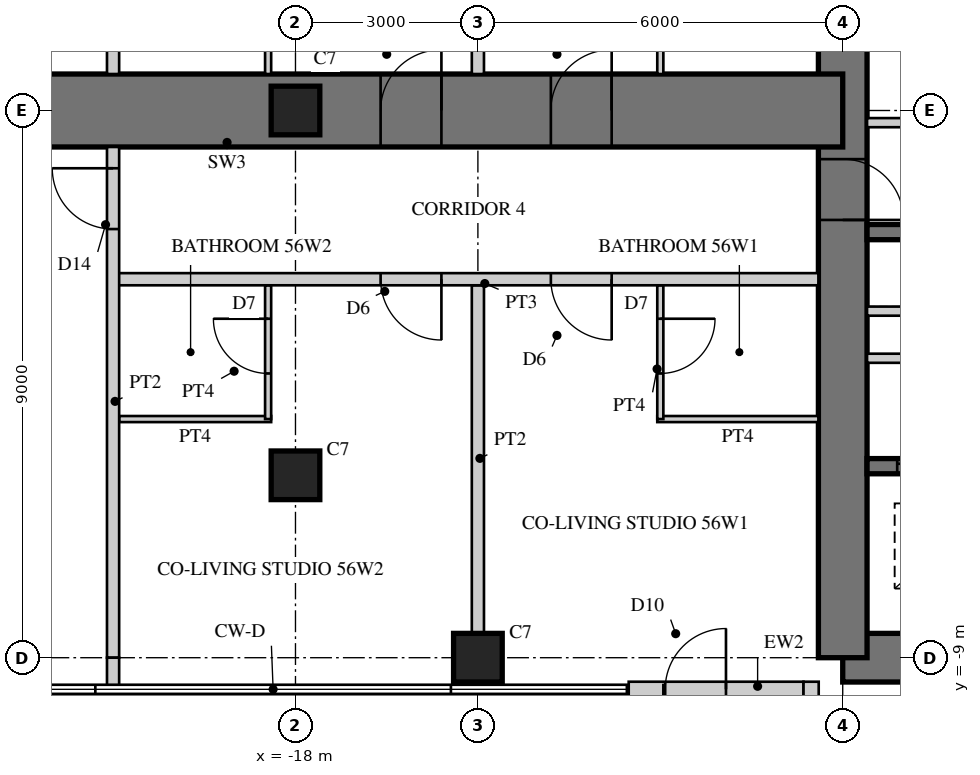
"""IFC4 building model, lengths in metres.
Left out: names, types, materials, properties, quantities, classifications, styles, units other than length and angle.
Written with IfcOpenShell. Run it as: python <this file> out.ifc"""

import sys

from ifc_helpers import new_model, si_unit, direction, frame, frame_2d, origin, origin_2d, place, context, subcontext, project, spatial, rectangle, hollow_rectangle, extrude, element, fill, save


model = new_model("IFC4")
c1 = context("Model", 3, precision=1e-05, world=origin(), true_north=direction((0.0, 1.0)))
c2 = subcontext(c1, "Body", "Model", "MODEL_VIEW")
j1 = project(units=[si_unit("LENGTHUNIT", "METRE"), si_unit("PLANEANGLEUNIT", "RADIAN")], contexts=[c1])
p1 = place(None, origin())
s1 = spatial("IfcSite", under=j1, at=p1, CompositionType="ELEMENT")
p2 = place(p1, origin())
s2 = spatial("IfcBuilding", under=s1, at=p2, CompositionType="ELEMENT")
p3 = place(p2, frame((0.0, 0.0, 222.1)))
s3 = spatial("IfcBuildingStorey", under=s2, at=p3, CompositionType="ELEMENT", Elevation=222.1)
p4 = place(p3, frame((-9.0, -9.0, 0.0), z_axis=(0.0, 0.0, 1.0), x_axis=(1.0, 0.0, 0.0)))
e1 = element("IfcWall", 1, at=p4, inside=s3, PredefinedType="SHEAR", context=c2, shape_type="SweptSolid", body=[
    extrude(rectangle(XDim=18.0, YDim=0.8, at=frame_2d((9.0, 0.0))), origin(), (0.0, 0.0, 1.0), 3.4),
])
p5 = place(p4, frame((9.8, 0.0, 0.0)))
e2 = element("IfcOpeningElement", 2, at=p5, cuts=e1, PredefinedType="OPENING", context=c2, shape_type="SweptSolid", body=[
    extrude(rectangle(XDim=1.0, YDim=2.4, at=frame_2d((0.5, 1.2))), frame((0.0, 0.41, 0.0), z_axis=(0.0, -1.0, 0.0), x_axis=(1.0, 0.0, 0.0)), (0.0, 0.0, 1.0), 0.82),
])
p6 = place(p3, frame((-9.0, 9.0, 0.0), z_axis=(0.0, 0.0, 1.0), x_axis=(0.0, -1.0, 0.0)))
e3 = element("IfcWall", 3, at=p6, inside=s3, PredefinedType="SHEAR", context=c2, shape_type="SweptSolid", body=[
    extrude(rectangle(XDim=18.0, YDim=0.8, at=frame_2d((9.0, 0.0))), origin(), (0.0, 0.0, 1.0), 3.4),
])
p7 = place(p6, frame((9.8, 0.0, 0.0)))
e4 = element("IfcOpeningElement", 4, at=p7, cuts=e3, PredefinedType="OPENING", context=c2, shape_type="SweptSolid", body=[
    extrude(rectangle(XDim=1.0, YDim=2.4, at=frame_2d((0.5, 1.2))), frame((0.0, 0.41, 0.0), z_axis=(0.0, -1.0, 0.0), x_axis=(1.0, 0.0, 0.0)), (0.0, 0.0, 1.0), 0.82),
])
p8 = place(p3, frame((-1.925, -2.0, 0.0), z_axis=(0.0, 0.0, 1.0), x_axis=(-1.0, 0.0, 0.0)))
e5 = element("IfcWall", 5, at=p8, inside=s3, PredefinedType="SHEAR", context=c2, shape_type="SweptSolid", body=[
    extrude(rectangle(XDim=6.675, YDim=0.25, at=frame_2d((3.337, 0.0))), origin(), (0.0, 0.0, 1.0), 3.4),
])
p9 = place(p3, frame((-1.925, -5.85, 0.0), z_axis=(0.0, 0.0, 1.0), x_axis=(-1.0, 0.0, 0.0)))
e6 = element("IfcWall", 6, at=p9, inside=s3, PredefinedType="SHEAR", context=c2, shape_type="SweptSolid", body=[
    extrude(rectangle(XDim=6.675, YDim=0.25, at=frame_2d((3.337, 0.0))), origin(), (0.0, 0.0, 1.0), 3.4),
])
p10 = place(p9, frame((0.496, 0.0, 0.0)))
e7 = element("IfcOpeningElement", 7, at=p10, cuts=e6, PredefinedType="OPENING", context=c2, shape_type="SweptSolid", body=[
    extrude(rectangle(XDim=1.1, YDim=2.2, at=frame_2d((0.55, 1.1))), frame((0.0, 0.135, 0.0), z_axis=(0.0, -1.0, 0.0), x_axis=(1.0, 0.0, 0.0)), (0.0, 0.0, 1.0), 0.27),
])
p11 = place(p9, frame((2.788, 0.0, 0.0)))
e8 = element("IfcOpeningElement", 8, at=p11, cuts=e6, PredefinedType="OPENING", context=c2, shape_type="SweptSolid", body=[
    extrude(rectangle(XDim=1.1, YDim=2.2, at=frame_2d((0.55, 1.1))), frame((0.0, 0.135, 0.0), z_axis=(0.0, -1.0, 0.0), x_axis=(1.0, 0.0, 0.0)), (0.0, 0.0, 1.0), 0.27),
])
p12 = place(p9, frame((5.079, 0.0, 0.0)))
e9 = element("IfcOpeningElement", 9, at=p12, cuts=e6, PredefinedType="OPENING", context=c2, shape_type="SweptSolid", body=[
    extrude(rectangle(XDim=1.1, YDim=2.2, at=frame_2d((0.55, 1.1))), frame((0.0, 0.135, 0.0), z_axis=(0.0, -1.0, 0.0), x_axis=(1.0, 0.0, 0.0)), (0.0, 0.0, 1.0), 0.27),
])
p13 = place(p3, frame((-1.925, -3.3, 0.0), z_axis=(0.0, 0.0, 1.0), x_axis=(-1.0, 0.0, 0.0)))
e10 = element("IfcWall", 10, at=p13, inside=s3, PredefinedType="PARTITIONING", context=c2, shape_type="SweptSolid", body=[
    extrude(rectangle(XDim=6.675, YDim=0.15, at=frame_2d((3.337, 0.0))), origin(), (0.0, 0.0, 1.0), 3.4),
])
p14 = place(p13, frame((0.075, 0.0, 0.0)))
e11 = element("IfcOpeningElement", 11, at=p14, cuts=e10, PredefinedType="OPENING", context=c2, shape_type="SweptSolid", body=[
    extrude(rectangle(XDim=0.8, YDim=2.1, at=frame_2d((0.4, 1.05))), frame((0.0, 0.085, 0.0), z_axis=(0.0, -1.0, 0.0), x_axis=(1.0, 0.0, 0.0)), (0.0, 0.0, 1.0), 0.17),
])
p15 = place(p13, frame((3.675, 0.0, 0.0)))
e12 = element("IfcOpeningElement", 12, at=p15, cuts=e10, PredefinedType="OPENING", context=c2, shape_type="SweptSolid", body=[
    extrude(rectangle(XDim=0.8, YDim=2.1, at=frame_2d((0.4, 1.05))), frame((0.0, 0.085, 0.0), z_axis=(0.0, -1.0, 0.0), x_axis=(1.0, 0.0, 0.0)), (0.0, 0.0, 1.0), 0.17),
])
p16 = place(p3, frame((-9.0, 0.0, 0.0), z_axis=(0.0, 0.0, 1.0), x_axis=(-1.0, 0.0, 0.0)))
e13 = element("IfcWall", 13, at=p16, inside=s3, PredefinedType="SHEAR", context=c2, shape_type="SweptSolid", body=[
    extrude(rectangle(XDim=18.0, YDim=1.2, at=frame_2d((9.0, 0.0))), origin(), (0.0, 0.0, 1.0), 3.4),
])
p17 = place(p16, frame((3.8, 0.0, 0.0)))
e14 = element("IfcOpeningElement", 14, at=p17, cuts=e13, PredefinedType="OPENING", context=c2, shape_type="SweptSolid", body=[
    extrude(rectangle(XDim=1.0, YDim=2.15, at=frame_2d((0.5, 1.075))), frame((0.0, 0.61, 0.0), z_axis=(0.0, -1.0, 0.0), x_axis=(1.0, 0.0, 0.0)), (0.0, 0.0, 1.0), 1.22),
])
p18 = place(p16, frame((6.6, 0.0, 0.0)))
e15 = element("IfcOpeningElement", 15, at=p18, cuts=e13, PredefinedType="OPENING", context=c2, shape_type="SweptSolid", body=[
    extrude(rectangle(XDim=1.0, YDim=2.15, at=frame_2d((0.5, 1.075))), frame((0.0, 0.61, 0.0), z_axis=(0.0, -1.0, 0.0), x_axis=(1.0, 0.0, 0.0)), (0.0, 0.0, 1.0), 1.22),
])
p19 = place(p16, frame((13.3, 0.0, 0.0)))
e16 = element("IfcOpeningElement", 16, at=p19, cuts=e13, PredefinedType="OPENING", context=c2, shape_type="SweptSolid", body=[
    extrude(rectangle(XDim=1.0, YDim=2.2, at=frame_2d((0.5, 1.1))), frame((0.0, 0.61, 0.0), z_axis=(0.0, -1.0, 0.0), x_axis=(1.0, 0.0, 0.0)), (0.0, 0.0, 1.0), 1.22),
])
for number, where, z_axis, x_axis in (
    (17, (-15.0, -9.0, 0.0), (0.0, 0.0, 1.0), (1.0, 0.0, 0.0)),
    (18, (-18.0, 0.0, 0.0), (0.0, 0.0, 1.0), (1.0, 0.0, 0.0)),
    (19, (-18.0, -6.0, 0.0), (0.0, 0.0, 1.0), (1.0, 0.0, 0.0)),
):
    element("IfcColumn", number, at=place(p3, frame(where, z_axis=z_axis, x_axis=x_axis)), inside=s3, PredefinedType="COLUMN", context=c2, shape_type="SweptSolid", body=[
        extrude(rectangle(XDim=0.8, YDim=0.8, at=origin_2d()), origin(), (0.0, 0.0, 1.0), 3.4),
    ])
p20 = place(p3, frame((-12.52, -9.52, 0.0), z_axis=(0.0, 0.0, 1.0), x_axis=(1.0, 0.0, 0.0)))
e20 = element("IfcWall", 20, at=p20, inside=s3, PredefinedType="SOLIDWALL", context=c2, shape_type="SweptSolid", body=[
    extrude(rectangle(XDim=2.875, YDim=0.25, at=frame_2d((1.438, 0.0))), origin(), (0.0, 0.0, 1.0), 3.22),
])
p21 = place(p20, frame((0.6, 0.0, 0.0)))
e21 = element("IfcOpeningElement", 21, at=p21, cuts=e20, PredefinedType="OPENING", context=c2, shape_type="SweptSolid", body=[
    extrude(rectangle(XDim=1.0, YDim=2.2, at=frame_2d((0.5, 1.1))), frame((0.0, 0.135, 0.0), z_axis=(0.0, -1.0, 0.0), x_axis=(1.0, 0.0, 0.0)), (0.0, 0.0, 1.0), 0.27),
])
p22 = place(p3, frame((-9.52, -9.395, 0.0), z_axis=(0.0, 0.0, 1.0), x_axis=(0.0, -1.0, 0.0)))
e22 = element("IfcWall", 22, at=p22, inside=s3, PredefinedType="SOLIDWALL", context=c2, shape_type="SweptSolid", body=[
    extrude(rectangle(XDim=3.125, YDim=0.25, at=frame_2d((1.562, 0.0))), origin(), (0.0, 0.0, 1.0), 3.22),
])
p23 = place(p22, frame((0.6, 0.0, 0.0)))
e23 = element("IfcOpeningElement", 23, at=p23, cuts=e22, PredefinedType="OPENING", context=c2, shape_type="SweptSolid", body=[
    extrude(rectangle(XDim=1.0, YDim=2.2, at=frame_2d((0.5, 1.1))), frame((0.0, 0.135, 0.0), z_axis=(0.0, -1.0, 0.0), x_axis=(1.0, 0.0, 0.0)), (0.0, 0.0, 1.0), 0.27),
])
p24 = place(p3, frame((-2.325, -0.2, 0.0), z_axis=(0.0, 0.0, 1.0), x_axis=(-1.0, 0.0, 0.0)))
e24 = element("IfcWall", 24, at=p24, inside=s3, PredefinedType="PARTITIONING", context=c2, shape_type="SweptSolid", body=[
    extrude(rectangle(XDim=6.275, YDim=0.15, at=frame_2d((3.138, 0.0))), origin(), (0.0, 0.0, 1.0), 3.22),
])
p25 = place(p24, frame((0.4, 0.0, 0.0)))
e25 = element("IfcOpeningElement", 25, at=p25, cuts=e24, PredefinedType="OPENING", context=c2, shape_type="SweptSolid", body=[
    extrude(rectangle(XDim=1.0, YDim=2.1, at=frame_2d((0.5, 1.05))), frame((0.0, 0.085, 0.0), z_axis=(0.0, -1.0, 0.0), x_axis=(1.0, 0.0, 0.0)), (0.0, 0.0, 1.0), 0.17),
])
p26 = place(p3, frame((-3.325, -4.075, 0.0), z_axis=(0.0, 0.0, 1.0), x_axis=(-1.0, 0.0, 0.0)))
e26 = element("IfcWall", 26, at=p26, inside=s3, PredefinedType="PARTITIONING", context=c2, shape_type="SweptSolid", body=[
    extrude(rectangle(XDim=5.275, YDim=0.15, at=frame_2d((2.638, 0.0))), origin(), (0.0, 0.0, 1.0), 3.22),
])
p27 = place(p26, frame((2.137, 0.0, 0.0)))
e27 = element("IfcOpeningElement", 27, at=p27, cuts=e26, PredefinedType="OPENING", context=c2, shape_type="SweptSolid", body=[
    extrude(rectangle(XDim=1.0, YDim=2.1, at=frame_2d((0.5, 1.05))), frame((0.0, 0.085, 0.0), z_axis=(0.0, -1.0, 0.0), x_axis=(1.0, 0.0, 0.0)), (0.0, 0.0, 1.0), 0.17),
])
p28 = place(p3, frame((-9.4, -5.075, 0.0), z_axis=(0.0, 0.0, 1.0), x_axis=(-1.0, 0.0, 0.0)))
e28 = element("IfcWall", 28, at=p28, inside=s3, PredefinedType="PARTITIONING", context=c2, shape_type="SweptSolid", body=[
    extrude(rectangle(XDim=2.65, YDim=0.1, at=frame_2d((1.325, 0.0))), origin(), (0.0, 0.0, 1.0), 3.22),
])
p29 = place(p3, frame((-12.0, -2.875, 0.0), z_axis=(0.0, 0.0, 1.0), x_axis=(0.0, -1.0, 0.0)))
e29 = element("IfcWall", 29, at=p29, inside=s3, PredefinedType="PARTITIONING", context=c2, shape_type="SweptSolid", body=[
    extrude(rectangle(XDim=2.2, YDim=0.1, at=frame_2d((1.1, 0.0))), origin(), (0.0, 0.0, 1.0), 3.22),
])
p30 = place(p29, frame((0.55, 0.0, 0.0)))
e30 = element("IfcOpeningElement", 30, at=p30, cuts=e29, PredefinedType="OPENING", context=c2, shape_type="SweptSolid", body=[
    extrude(rectangle(XDim=0.9, YDim=2.1, at=frame_2d((0.45, 1.05))), frame((0.0, 0.06, 0.0), z_axis=(0.0, -1.0, 0.0), x_axis=(1.0, 0.0, 0.0)), (0.0, 0.0, 1.0), 0.12),
])
p31 = place(p3, frame((-12.0, 2.8, 0.0), z_axis=(0.0, 0.0, 1.0), x_axis=(0.0, -1.0, 0.0)))
e31 = element("IfcWall", 31, at=p31, inside=s3, PredefinedType="PARTITIONING", context=c2, shape_type="SweptSolid", body=[
    extrude(rectangle(XDim=2.2, YDim=0.1, at=frame_2d((1.1, 0.0))), origin(), (0.0, 0.0, 1.0), 3.22),
])
p32 = place(p31, frame((0.55, 0.0, 0.0)))
e32 = element("IfcOpeningElement", 32, at=p32, cuts=e31, PredefinedType="OPENING", context=c2, shape_type="SweptSolid", body=[
    extrude(rectangle(XDim=0.9, YDim=2.1, at=frame_2d((0.45, 1.05))), frame((0.0, 0.06, 0.0), z_axis=(0.0, -1.0, 0.0), x_axis=(1.0, 0.0, 0.0)), (0.0, 0.0, 1.0), 0.12),
])
p33 = place(p3, frame((-15.0, -2.875, 0.0), z_axis=(0.0, 0.0, 1.0), x_axis=(0.0, -1.0, 0.0)))
e33 = element("IfcWall", 33, at=p33, inside=s3, PredefinedType="SOLIDWALL", context=c2, shape_type="SweptSolid", body=[
    extrude(rectangle(XDim=5.725, YDim=0.2, at=frame_2d((2.863, 0.0))), origin(), (0.0, 0.0, 1.0), 2.52),
])
p34 = place(p3, frame((-15.0, 8.6, 0.0), z_axis=(0.0, 0.0, 1.0), x_axis=(0.0, -1.0, 0.0)))
e34 = element("IfcWall", 34, at=p34, inside=s3, PredefinedType="SOLIDWALL", context=c2, shape_type="SweptSolid", body=[
    extrude(rectangle(XDim=8.0, YDim=0.2, at=frame_2d((4.0, 0.0))), origin(), (0.0, 0.0, 1.0), 2.52),
])
p35 = place(p3, frame((-18.4, -5.075, 0.0), z_axis=(0.0, 0.0, 1.0), x_axis=(-1.0, 0.0, 0.0)))
e35 = element("IfcWall", 35, at=p35, inside=s3, PredefinedType="PARTITIONING", context=c2, shape_type="SweptSolid", body=[
    extrude(rectangle(XDim=2.5, YDim=0.1, at=frame_2d((1.25, 0.0))), origin(), (0.0, 0.0, 1.0), 3.22),
])
p36 = place(p3, frame((-18.45, -2.875, 0.0), z_axis=(0.0, 0.0, 1.0), x_axis=(0.0, -1.0, 0.0)))
e36 = element("IfcWall", 36, at=p36, inside=s3, PredefinedType="PARTITIONING", context=c2, shape_type="SweptSolid", body=[
    extrude(rectangle(XDim=2.2, YDim=0.1, at=frame_2d((1.1, 0.0))), origin(), (0.0, 0.0, 1.0), 3.22),
])
p37 = place(p36, frame((0.55, 0.0, 0.0)))
e37 = element("IfcOpeningElement", 37, at=p37, cuts=e36, PredefinedType="OPENING", context=c2, shape_type="SweptSolid", body=[
    extrude(rectangle(XDim=0.9, YDim=2.1, at=frame_2d((0.45, 1.05))), frame((0.0, 0.06, 0.0), z_axis=(0.0, -1.0, 0.0), x_axis=(1.0, 0.0, 0.0)), (0.0, 0.0, 1.0), 0.12),
])
p38 = place(p3, frame((-18.45, 2.8, 0.0), z_axis=(0.0, 0.0, 1.0), x_axis=(0.0, -1.0, 0.0)))
e38 = element("IfcWall", 38, at=p38, inside=s3, PredefinedType="PARTITIONING", context=c2, shape_type="SweptSolid", body=[
    extrude(rectangle(XDim=2.2, YDim=0.1, at=frame_2d((1.1, 0.0))), origin(), (0.0, 0.0, 1.0), 3.22),
])
p39 = place(p38, frame((0.55, 0.0, 0.0)))
e39 = element("IfcOpeningElement", 39, at=p39, cuts=e38, PredefinedType="OPENING", context=c2, shape_type="SweptSolid", body=[
    extrude(rectangle(XDim=0.9, YDim=2.1, at=frame_2d((0.45, 1.05))), frame((0.0, 0.06, 0.0), z_axis=(0.0, -1.0, 0.0), x_axis=(1.0, 0.0, 0.0)), (0.0, 0.0, 1.0), 0.12),
])
p40 = place(p3, frame((-9.4, -2.775, 0.0), z_axis=(0.0, 0.0, 1.0), x_axis=(-1.0, 0.0, 0.0)))
e40 = element("IfcWall", 40, at=p40, inside=s3, PredefinedType="SOLIDWALL", context=c2, shape_type="SweptSolid", body=[
    extrude(rectangle(XDim=11.6, YDim=0.2, at=frame_2d((5.8, 0.0))), origin(), (0.0, 0.0, 1.0), 3.22),
])
p41 = place(p40, frame((3.4, 0.0, 0.0)))
e41 = element("IfcOpeningElement", 41, at=p41, cuts=e40, PredefinedType="OPENING", context=c2, shape_type="SweptSolid", body=[
    extrude(rectangle(XDim=1.0, YDim=2.15, at=frame_2d((0.5, 1.075))), frame((0.0, 0.11, 0.0), z_axis=(0.0, -1.0, 0.0), x_axis=(1.0, 0.0, 0.0)), (0.0, 0.0, 1.0), 0.22),
])
p42 = place(p40, frame((6.2, 0.0, 0.0)))
e42 = element("IfcOpeningElement", 42, at=p42, cuts=e40, PredefinedType="OPENING", context=c2, shape_type="SweptSolid", body=[
    extrude(rectangle(XDim=1.0, YDim=2.15, at=frame_2d((0.5, 1.075))), frame((0.0, 0.11, 0.0), z_axis=(0.0, -1.0, 0.0), x_axis=(1.0, 0.0, 0.0)), (0.0, 0.0, 1.0), 0.22),
])
p43 = place(p3, frame((-21.0, 9.0, 0.0), z_axis=(0.0, 0.0, 1.0), x_axis=(0.0, -1.0, 0.0)))
e43 = element("IfcWall", 43, at=p43, inside=s3, PredefinedType="SOLIDWALL", context=c2, shape_type="SweptSolid", body=[
    extrude(rectangle(XDim=8.4, YDim=0.2, at=frame_2d((4.2, 0.0))), origin(), (0.0, 0.0, 1.0), 2.67),
])
p44 = place(p3, frame((-21.0, -0.6, 0.0), z_axis=(0.0, 0.0, 1.0), x_axis=(0.0, -1.0, 0.0)))
e44 = element("IfcWall", 44, at=p44, inside=s3, PredefinedType="SOLIDWALL", context=c2, shape_type="SweptSolid", body=[
    extrude(rectangle(XDim=8.4, YDim=0.2, at=frame_2d((4.2, 0.0))), origin(), (0.0, 0.0, 1.0), 2.67),
])
p45 = place(p44, frame((0.35, 0.0, 0.0)))
e45 = element("IfcOpeningElement", 45, at=p45, cuts=e44, PredefinedType="OPENING", context=c2, shape_type="SweptSolid", body=[
    extrude(rectangle(XDim=1.0, YDim=2.2, at=frame_2d((0.5, 1.1))), frame((0.0, 0.11, 0.0), z_axis=(0.0, -1.0, 0.0), x_axis=(1.0, 0.0, 0.0)), (0.0, 0.0, 1.0), 0.22),
])
p46 = place(p3, frame((-21.0, -9.0, 0.0), z_axis=(0.0, 0.0, 1.0), x_axis=(0.0, -1.0, 0.0)))
e46 = element("IfcWall", 46, at=p46, inside=s3, PredefinedType="SOLIDWALL", context=c2, shape_type="SweptSolid", body=[
    extrude(rectangle(XDim=0.48, YDim=0.2, at=frame_2d((0.24, 0.0))), origin(), (0.0, 0.0, 1.0), 3.22),
])
p47 = place(p21, origin())
e47 = element("IfcDoor", 47, at=p47, inside=s3, OperationType="SINGLE_SWING_RIGHT", PredefinedType="DOOR", context=c2, shape_type="SweptSolid", body=[
    extrude(hollow_rectangle(XDim=1.0, YDim=2.2, WallThickness=0.06, at=frame_2d((0.5, 1.1))), frame((0.0, 0.025, 0.0), z_axis=(0.0, -1.0, 0.0), x_axis=(1.0, 0.0, 0.0)), (0.0, 0.0, 1.0), 0.05),
    extrude(rectangle(XDim=0.879, YDim=2.079, at=frame_2d((0.5, 1.1))), frame((0.0, 0.025, 0.0), z_axis=(0.0, -1.0, 0.0), x_axis=(1.0, 0.0, 0.0)), (0.0, 0.0, 1.0), 0.05),
])
fill(e21, e47)
p48 = place(p30, origin())
e48 = element("IfcDoor", 48, at=p48, inside=s3, OperationType="SINGLE_SWING_LEFT", PredefinedType="DOOR", context=c2, shape_type="SweptSolid", body=[
    extrude(rectangle(XDim=0.9, YDim=2.1, at=frame_2d((0.45, 1.05))), frame((0.0, 0.025, 0.0), z_axis=(0.0, -1.0, 0.0), x_axis=(1.0, 0.0, 0.0)), (0.0, 0.0, 1.0), 0.05),
])
fill(e30, e48)
p49 = place(p37, frame((0.9, 0.0, 0.0), z_axis=(0.0, 0.0, 1.0), x_axis=(-1.0, 0.0, 0.0)))
e49 = element("IfcDoor", 49, at=p49, inside=s3, OperationType="SINGLE_SWING_RIGHT", PredefinedType="DOOR", context=c2, shape_type="SweptSolid", body=[
    extrude(rectangle(XDim=0.9, YDim=2.1, at=frame_2d((0.45, 1.05))), frame((0.0, 0.025, 0.0), z_axis=(0.0, -1.0, 0.0), x_axis=(1.0, 0.0, 0.0)), (0.0, 0.0, 1.0), 0.05),
])
fill(e37, e49)
p50 = place(p41, origin())
e50 = element("IfcDoor", 50, at=p50, inside=s3, OperationType="SINGLE_SWING_LEFT", PredefinedType="DOOR", context=c2, shape_type="SweptSolid", body=[
    extrude(rectangle(XDim=1.0, YDim=2.15, at=frame_2d((0.5, 1.075))), frame((0.0, 0.025, 0.0), z_axis=(0.0, -1.0, 0.0), x_axis=(1.0, 0.0, 0.0)), (0.0, 0.0, 1.0), 0.05),
])
fill(e41, e50)
p51 = place(p42, origin())
e51 = element("IfcDoor", 51, at=p51, inside=s3, OperationType="SINGLE_SWING_LEFT", PredefinedType="DOOR", context=c2, shape_type="SweptSolid", body=[
    extrude(rectangle(XDim=1.0, YDim=2.15, at=frame_2d((0.5, 1.075))), frame((0.0, 0.025, 0.0), z_axis=(0.0, -1.0, 0.0), x_axis=(1.0, 0.0, 0.0)), (0.0, 0.0, 1.0), 0.05),
])
fill(e42, e51)
p52 = place(p45, frame((1.0, 0.0, 0.0), z_axis=(0.0, 0.0, 1.0), x_axis=(-1.0, 0.0, 0.0)))
e52 = element("IfcDoor", 52, at=p52, inside=s3, OperationType="SINGLE_SWING_RIGHT", PredefinedType="DOOR", context=c2, shape_type="SweptSolid", body=[
    extrude(rectangle(XDim=1.0, YDim=2.2, at=frame_2d((0.5, 1.1))), frame((0.0, 0.025, 0.0), z_axis=(0.0, -1.0, 0.0), x_axis=(1.0, 0.0, 0.0)), (0.0, 0.0, 1.0), 0.05),
])
fill(e45, e52)
p53 = place(p17, frame((1.0, 0.0, 0.0), z_axis=(0.0, 0.0, 1.0), x_axis=(-1.0, 0.0, 0.0)))
e53 = element("IfcDoor", 53, at=p53, inside=s3, OperationType="SINGLE_SWING_RIGHT", PredefinedType="DOOR", context=c2, shape_type="SweptSolid", body=[
    extrude(rectangle(XDim=1.0, YDim=2.15, at=frame_2d((0.5, 1.075))), frame((0.0, 0.025, 0.0), z_axis=(0.0, -1.0, 0.0), x_axis=(1.0, 0.0, 0.0)), (0.0, 0.0, 1.0), 0.05),
])
fill(e14, e53)
p54 = place(p18, frame((1.0, 0.0, 0.0), z_axis=(0.0, 0.0, 1.0), x_axis=(-1.0, 0.0, 0.0)))
e54 = element("IfcDoor", 54, at=p54, inside=s3, OperationType="SINGLE_SWING_RIGHT", PredefinedType="DOOR", context=c2, shape_type="SweptSolid", body=[
    extrude(rectangle(XDim=1.0, YDim=2.15, at=frame_2d((0.5, 1.075))), frame((0.0, 0.025, 0.0), z_axis=(0.0, -1.0, 0.0), x_axis=(1.0, 0.0, 0.0)), (0.0, 0.0, 1.0), 0.05),
])
fill(e15, e54)
p55 = place(p7, origin())
e55 = element("IfcDoor", 55, at=p55, inside=s3, OperationType="SINGLE_SWING_RIGHT", PredefinedType="DOOR", context=c2, shape_type="SweptSolid", body=[
    extrude(rectangle(XDim=1.0, YDim=2.4, at=frame_2d((0.5, 1.2))), frame((0.0, 0.055, 0.0), z_axis=(0.0, -1.0, 0.0), x_axis=(1.0, 0.0, 0.0)), (0.0, 0.0, 1.0), 0.05),
])
fill(e4, e55)
p56 = place(p12, origin())
e56 = element("IfcDoor", 56, at=p56, inside=s3, OperationType="DOUBLE_DOOR_SLIDING", PredefinedType="DOOR", context=c2, shape_type="SweptSolid", body=[
    extrude(rectangle(XDim=1.1, YDim=2.2, at=frame_2d((0.55, 1.1))), frame((0.0, 0.025, 0.0), z_axis=(0.0, -1.0, 0.0), x_axis=(1.0, 0.0, 0.0)), (0.0, 0.0, 1.0), 0.05),
])
fill(e9, e56)
save(model, sys.argv[1])
